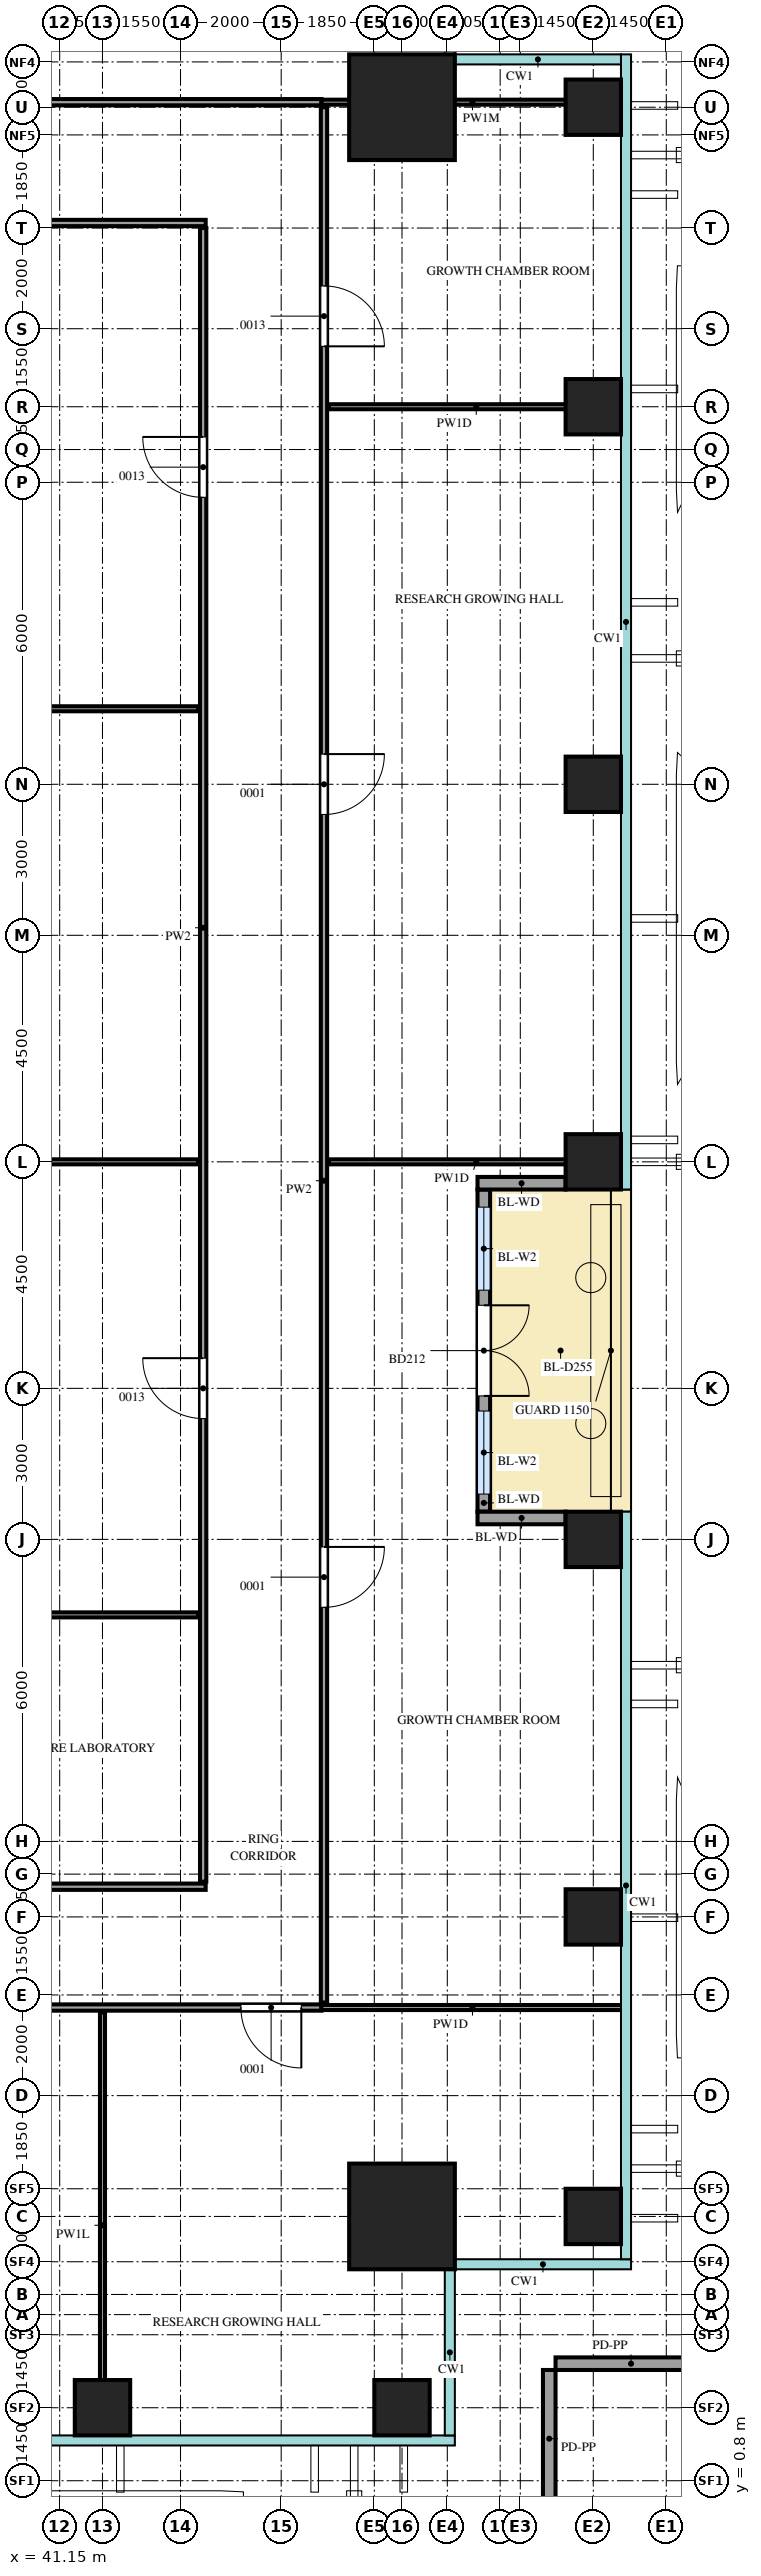
"""IFC4 building model, lengths in metres.
Left out: names, types, materials, properties, quantities, classifications, styles, units other than length and angle.
Written with IfcOpenShell. Run it as: python <this file> out.ifc"""

import sys

from ifc_helpers import new_model, si_unit, direction, frame, frame_2d, origin, origin_2d, place, context, subcontext, project, spatial, rectangle, extrude, source, transform, mapped, element, fill, save


model = new_model("IFC4")
c1 = context("Model", 3, precision=1e-05, world=origin(), true_north=direction((0.0, 1.0)))
c2 = subcontext(c1, "Body", "Model", "MODEL_VIEW")
j1 = project(units=[si_unit("LENGTHUNIT", "METRE"), si_unit("PLANEANGLEUNIT", "RADIAN")], contexts=[c1])
p1 = place(None, origin())
s1 = spatial("IfcSite", under=j1, at=p1, CompositionType="ELEMENT")
p2 = place(p1, origin())
s2 = spatial("IfcBuilding", under=s1, at=p2, CompositionType="ELEMENT")
p3 = place(p2, frame((0.0, 0.0, 101.5)))
s3 = spatial("IfcBuildingStorey", under=s2, at=p3, CompositionType="ELEMENT", Elevation=101.5)
m1 = source(origin(), c2, "Body", "SweptSolid", [
    extrude(rectangle(XDim=2.1, YDim=2.1, at=origin_2d()), origin(), (0.0, 0.0, 1.0), 4.4),
])
for number, where, z_axis, x_axis in (
    (1, (47.95, 47.95, 0.0), (0.0, 0.0, 1.0), (1.0, 0.0, 0.0)),
    (2, (47.95, 6.05, 0.0), (0.0, 0.0, 1.0), (1.0, 0.0, 0.0)),
):
    element("IfcColumn", number, at=place(p3, frame(where, z_axis=z_axis, x_axis=x_axis)), inside=s3, PredefinedType="COLUMN", context=c2, shape_type="MappedRepresentation", body=[
        mapped(m1, transform((0.0, 0.0, 0.0))),
    ])
m2 = source(origin(), c2, "Body", "SweptSolid", [
    extrude(rectangle(XDim=1.1, YDim=1.1, at=origin_2d()), origin(), (0.0, 0.0, 1.0), 4.1),
])
for number, where, z_axis, x_axis in (
    (3, (42.0, 2.25, 0.0), (0.0, 0.0, 1.0), (1.0, 0.0, 0.0)),
    (4, (47.95, 2.25, 0.0), (0.0, 0.0, 1.0), (1.0, 0.0, 0.0)),
    (5, (51.75, 6.05, 0.0), (0.0, 0.0, 1.0), (1.0, 0.0, 0.0)),
    (6, (51.75, 12.0, 0.0), (0.0, 0.0, 1.0), (1.0, 0.0, 0.0)),
    (7, (51.75, 19.5, 0.0), (0.0, 0.0, 1.0), (1.0, 0.0, 0.0)),
    (8, (51.75, 27.0, 0.0), (0.0, 0.0, 1.0), (1.0, 0.0, 0.0)),
    (9, (51.75, 34.5, 0.0), (0.0, 0.0, 1.0), (1.0, 0.0, 0.0)),
    (10, (51.75, 42.0, 0.0), (0.0, 0.0, 1.0), (1.0, 0.0, 0.0)),
    (11, (51.75, 47.95, 0.0), (0.0, 0.0, 1.0), (1.0, 0.0, 0.0)),
):
    element("IfcColumn", number, at=place(p3, frame(where, z_axis=z_axis, x_axis=x_axis)), inside=s3, PredefinedType="COLUMN", context=c2, shape_type="MappedRepresentation", body=[
        mapped(m2, transform((0.0, 0.0, 0.0))),
    ])
m3 = source(origin(), c2, "Body", "SweptSolid", [
    extrude(rectangle(XDim=6.4, YDim=0.25, at=frame_2d((3.2, 0.0))), origin(), (0.0, 0.0, 1.0), 3.55),
])
p4 = place(p3, frame((49.575, 20.05, 0.0), z_axis=(0.0, 0.0, 1.0), x_axis=(0.0, 1.0, 0.0)))
e12 = element("IfcWall", 12, at=p4, inside=s3, PredefinedType="SOLIDWALL", context=c2, shape_type="MappedRepresentation", body=[
    mapped(m3, transform((0.0, 0.0, 0.0))),
])
m4 = source(origin(), c2, "Body", "SweptSolid", [
    extrude(rectangle(XDim=1.65, YDim=2.4, at=frame_2d((0.825, 1.2))), frame((0.0, 0.135, 0.0), z_axis=(0.0, -1.0, 0.0), x_axis=(1.0, 0.0, 0.0)), (0.0, 0.0, 1.0), 0.27),
])
p5 = place(p4, frame((0.35, 0.0, 0.0)))
e13 = element("IfcOpeningElement", 13, at=p5, cuts=e12, PredefinedType="OPENING", context=c2, shape_type="MappedRepresentation", body=[
    mapped(m4, transform((0.0, 0.0, 0.0))),
])
p6 = place(p4, frame((4.4, 0.0, 0.0)))
e14 = element("IfcOpeningElement", 14, at=p6, cuts=e12, PredefinedType="OPENING", context=c2, shape_type="MappedRepresentation", body=[
    mapped(m4, transform((0.0, 0.0, 0.0))),
])
m5 = source(origin(), c2, "Body", "SweptSolid", [
    extrude(rectangle(XDim=1.8, YDim=2.4, at=frame_2d((0.9, 1.2))), frame((0.0, 0.135, 0.0), z_axis=(0.0, -1.0, 0.0), x_axis=(1.0, 0.0, 0.0)), (0.0, 0.0, 1.0), 0.27),
])
p7 = place(p4, frame((2.3, 0.0, 0.0)))
e15 = element("IfcOpeningElement", 15, at=p7, cuts=e12, PredefinedType="OPENING", context=c2, shape_type="MappedRepresentation", body=[
    mapped(m5, transform((0.0, 0.0, 0.0))),
])
m6 = source(origin(), c2, "Body", "SweptSolid", [
    extrude(rectangle(XDim=1.75, YDim=0.25, at=frame_2d((0.875, 0.0))), origin(), (0.0, 0.0, 1.0), 3.55),
])
for number, where, z_axis, x_axis in (
    (16, (51.2, 19.925, 0.0), (0.0, 0.0, 1.0), (-1.0, 0.0, 0.0)),
    (17, (51.2, 26.575, 0.0), (0.0, 0.0, 1.0), (-1.0, 0.0, 0.0)),
):
    element("IfcWall", number, at=place(p3, frame(where, z_axis=z_axis, x_axis=x_axis)), inside=s3, PredefinedType="SOLIDWALL", context=c2, shape_type="MappedRepresentation", body=[
        mapped(m6, transform((0.0, 0.0, 0.0))),
    ])
m7 = source(origin(), c2, "Body", "SweptSolid", [
    extrude(rectangle(XDim=2.73, YDim=0.25, at=frame_2d((1.365, 0.0))), origin(), (0.0, 0.0, 1.0), 1.1),
])
p8 = place(p3, frame((50.875, 0.27, 0.0), z_axis=(0.0, 0.0, 1.0), x_axis=(0.0, 1.0, 0.0)))
e18 = element("IfcWall", 18, at=p8, inside=s3, PredefinedType="SOLIDWALL", context=c2, shape_type="MappedRepresentation", body=[
    mapped(m7, transform((0.0, 0.0, 0.0))),
])
m8 = source(origin(), c2, "Body", "SweptSolid", [
    extrude(rectangle(XDim=3.0, YDim=0.25, at=frame_2d((1.5, 0.0))), origin(), (0.0, 0.0, 1.0), 1.1),
])
p9 = place(p3, frame((51.0, 3.125, 0.0), z_axis=(0.0, 0.0, 1.0), x_axis=(1.0, 0.0, 0.0)))
e19 = element("IfcWall", 19, at=p9, inside=s3, PredefinedType="SOLIDWALL", context=c2, shape_type="MappedRepresentation", body=[
    mapped(m8, transform((0.0, 0.0, 0.0))),
])
m9 = source(origin(), c2, "Body", "SweptSolid", [
    extrude(rectangle(XDim=8.45, YDim=0.1, at=frame_2d((4.225, 0.0))), origin(), (0.0, 0.0, 1.0), 3.6),
])
p10 = place(p3, frame((42.0, 1.65, 0.0), z_axis=(0.0, 0.0, 1.0), x_axis=(0.0, 1.0, 0.0)))
e20 = element("IfcWall", 20, at=p10, inside=s3, PredefinedType="PARTITIONING", context=c2, shape_type="MappedRepresentation", body=[
    mapped(m9, transform((0.0, 0.0, 0.0))),
])
m10 = source(origin(), c2, "Body", "SweptSolid", [
    extrude(rectangle(XDim=20.0, YDim=0.125, at=frame_2d((10.0, 0.0))), origin(), (0.0, 0.0, 1.0), 4.2),
])
p11 = place(p3, frame((26.35, 10.2, 0.0), z_axis=(0.0, 0.0, 1.0), x_axis=(1.0, 0.0, 0.0)))
e21 = element("IfcWall", 21, at=p11, inside=s3, PredefinedType="PARTITIONING", context=c2, shape_type="MappedRepresentation", body=[
    mapped(m10, transform((0.0, 0.0, 0.0))),
])
m11 = source(origin(), c2, "Body", "SweptSolid", [
    extrude(rectangle(XDim=0.9, YDim=2.1, at=frame_2d((0.45, 1.05))), frame((0.0, 0.073, 0.0), z_axis=(0.0, -1.0, 0.0), x_axis=(1.0, 0.0, 0.0)), (0.0, 0.0, 1.0), 0.145),
])
p12 = place(p11, frame((3.8, 0.0, 0.0)))
e22 = element("IfcOpeningElement", 22, at=p12, cuts=e21, PredefinedType="OPENING", context=c2, shape_type="MappedRepresentation", body=[
    mapped(m11, transform((0.0, 0.0, 0.0))),
])
p13 = place(p11, frame((11.3, 0.0, 0.0)))
e23 = element("IfcOpeningElement", 23, at=p13, cuts=e21, PredefinedType="OPENING", context=c2, shape_type="MappedRepresentation", body=[
    mapped(m11, transform((0.0, 0.0, 0.0))),
])
m12 = source(origin(), c2, "Body", "SweptSolid", [
    extrude(rectangle(XDim=1.2, YDim=2.1, at=frame_2d((0.6, 1.05))), frame((0.0, 0.073, 0.0), z_axis=(0.0, -1.0, 0.0), x_axis=(1.0, 0.0, 0.0)), (0.0, 0.0, 1.0), 0.145),
])
p14 = place(p11, frame((18.4, 0.0, 0.0)))
e24 = element("IfcOpeningElement", 24, at=p14, cuts=e21, PredefinedType="OPENING", context=c2, shape_type="MappedRepresentation", body=[
    mapped(m12, transform((0.0, 0.0, 0.0))),
])
m13 = source(origin(), c2, "Body", "SweptSolid", [
    extrude(rectangle(XDim=6.0, YDim=0.1, at=frame_2d((3.0, 0.0))), origin(), (0.0, 0.0, 1.0), 4.2),
])
p15 = place(p3, frame((46.35, 10.2, 0.0), z_axis=(0.0, 0.0, 1.0), x_axis=(1.0, 0.0, 0.0)))
e25 = element("IfcWall", 25, at=p15, inside=s3, PredefinedType="PARTITIONING", context=c2, shape_type="MappedRepresentation", body=[
    mapped(m13, transform((0.0, 0.0, 0.0))),
])
m14 = source(origin(), c2, "Body", "SweptSolid", [
    extrude(rectangle(XDim=37.65, YDim=0.125, at=frame_2d((18.825, 0.0))), origin(), (0.0, 0.0, 1.0), 4.2),
])
p16 = place(p3, frame((46.4, 10.3, 0.0), z_axis=(0.0, 0.0, 1.0), x_axis=(0.0, 1.0, 0.0)))
e26 = element("IfcWall", 26, at=p16, inside=s3, PredefinedType="PARTITIONING", context=c2, shape_type="MappedRepresentation", body=[
    mapped(m14, transform((0.0, 0.0, 0.0))),
])
p17 = place(p16, frame((7.85, 0.0, 0.0)))
e27 = element("IfcOpeningElement", 27, at=p17, cuts=e26, PredefinedType="OPENING", context=c2, shape_type="MappedRepresentation", body=[
    mapped(m12, transform((0.0, 0.0, 0.0))),
])
p18 = place(p16, frame((23.6, 0.0, 0.0)))
e28 = element("IfcOpeningElement", 28, at=p18, cuts=e26, PredefinedType="OPENING", context=c2, shape_type="MappedRepresentation", body=[
    mapped(m12, transform((0.0, 0.0, 0.0))),
])
p19 = place(p16, frame((32.9, 0.0, 0.0)))
e29 = element("IfcOpeningElement", 29, at=p19, cuts=e26, PredefinedType="OPENING", context=c2, shape_type="MappedRepresentation", body=[
    mapped(m12, transform((0.0, 0.0, 0.0))),
])
m15 = source(origin(), c2, "Body", "SweptSolid", [
    extrude(rectangle(XDim=17.7, YDim=0.125, at=frame_2d((8.85, 0.0))), origin(), (0.0, 0.0, 1.0), 4.2),
])
p20 = place(p3, frame((26.35, 12.6, 0.0), z_axis=(0.0, 0.0, 1.0), x_axis=(1.0, 0.0, 0.0)))
e30 = element("IfcWall", 30, at=p20, inside=s3, PredefinedType="PARTITIONING", context=c2, shape_type="MappedRepresentation", body=[
    mapped(m15, transform((0.0, 0.0, 0.0))),
])
m16 = source(origin(), c2, "Body", "SweptSolid", [
    extrude(rectangle(XDim=32.85, YDim=0.125, at=frame_2d((16.425, 0.0))), origin(), (0.0, 0.0, 1.0), 4.2),
])
p21 = place(p3, frame((44.0, 12.7, 0.0), z_axis=(0.0, 0.0, 1.0), x_axis=(0.0, 1.0, 0.0)))
e31 = element("IfcWall", 31, at=p21, inside=s3, PredefinedType="PARTITIONING", context=c2, shape_type="MappedRepresentation", body=[
    mapped(m16, transform((0.0, 0.0, 0.0))),
])
p22 = place(p21, frame((9.2, 0.0, 0.0)))
e32 = element("IfcOpeningElement", 32, at=p22, cuts=e31, PredefinedType="OPENING", context=c2, shape_type="MappedRepresentation", body=[
    mapped(m12, transform((0.0, 0.0, 0.0))),
])
p23 = place(p21, frame((27.5, 0.0, 0.0)))
e33 = element("IfcOpeningElement", 33, at=p23, cuts=e31, PredefinedType="OPENING", context=c2, shape_type="MappedRepresentation", body=[
    mapped(m12, transform((0.0, 0.0, 0.0))),
])
m17 = source(origin(), c2, "Body", "SweptSolid", [
    extrude(rectangle(XDim=17.4, YDim=0.1, at=frame_2d((8.7, 0.0))), origin(), (0.0, 0.0, 1.0), 4.2),
])
for number, where, z_axis, x_axis in (
    (34, (26.5, 18.0, 0.0), (0.0, 0.0, 1.0), (1.0, 0.0, 0.0)),
    (35, (26.5, 27.0, 0.0), (0.0, 0.0, 1.0), (1.0, 0.0, 0.0)),
):
    element("IfcWall", number, at=place(p3, frame(where, z_axis=z_axis, x_axis=x_axis)), inside=s3, PredefinedType="PARTITIONING", context=c2, shape_type="MappedRepresentation", body=[
        mapped(m17, transform((0.0, 0.0, 0.0))),
    ])
m18 = source(origin(), c2, "Body", "SweptSolid", [
    extrude(rectangle(XDim=5.85, YDim=0.1, at=frame_2d((2.925, 0.0))), origin(), (0.0, 0.0, 1.0), 4.2),
])
p24 = place(p3, frame((46.5, 27.0, 0.0), z_axis=(0.0, 0.0, 1.0), x_axis=(1.0, 0.0, 0.0)))
e36 = element("IfcWall", 36, at=p24, inside=s3, PredefinedType="PARTITIONING", context=c2, shape_type="MappedRepresentation", body=[
    mapped(m18, transform((0.0, 0.0, 0.0))),
])
m19 = source(origin(), c2, "Body", "SweptSolid", [
    extrude(rectangle(XDim=13.35, YDim=0.1, at=frame_2d((6.675, 0.0))), origin(), (0.0, 0.0, 1.0), 4.2),
])
p25 = place(p3, frame((30.55, 36.0, 0.0), z_axis=(0.0, 0.0, 1.0), x_axis=(1.0, 0.0, 0.0)))
e37 = element("IfcWall", 37, at=p25, inside=s3, PredefinedType="PARTITIONING", context=c2, shape_type="MappedRepresentation", body=[
    mapped(m19, transform((0.0, 0.0, 0.0))),
])
p26 = place(p3, frame((46.5, 42.0, 0.0), z_axis=(0.0, 0.0, 1.0), x_axis=(1.0, 0.0, 0.0)))
e38 = element("IfcWall", 38, at=p26, inside=s3, PredefinedType="PARTITIONING", context=c2, shape_type="MappedRepresentation", body=[
    mapped(m18, transform((0.0, 0.0, 0.0))),
])
m20 = source(origin(), c2, "Body", "SweptSolid", [
    extrude(rectangle(XDim=13.5, YDim=0.125, at=frame_2d((6.75, 0.0))), origin(), (0.0, 0.0, 1.0), 4.2),
])
p27 = place(p3, frame((30.55, 45.65, 0.0), z_axis=(0.0, 0.0, 1.0), x_axis=(1.0, 0.0, 0.0)))
e39 = element("IfcWall", 39, at=p27, inside=s3, PredefinedType="PARTITIONING", context=c2, shape_type="MappedRepresentation", body=[
    mapped(m20, transform((0.0, 0.0, 0.0))),
])
m21 = source(origin(), c2, "Body", "SweptSolid", [
    extrude(rectangle(XDim=42.2, YDim=0.125, at=frame_2d((21.1, 0.0))), origin(), (0.0, 0.0, 1.0), 3.55),
])
p28 = place(p3, frame((4.15, 48.05, 0.0), z_axis=(0.0, 0.0, 1.0), x_axis=(1.0, 0.0, 0.0)))
e40 = element("IfcWall", 40, at=p28, inside=s3, PredefinedType="PARTITIONING", context=c2, shape_type="MappedRepresentation", body=[
    mapped(m21, transform((0.0, 0.0, 0.0))),
])
p29 = place(p28, frame((7.25, 0.0, 0.0)))
e41 = element("IfcOpeningElement", 41, at=p29, cuts=e40, PredefinedType="OPENING", context=c2, shape_type="MappedRepresentation", body=[
    mapped(m11, transform((0.0, 0.0, 0.0))),
])
p30 = place(p28, frame((28.35, 0.0, 0.0)))
e42 = element("IfcOpeningElement", 42, at=p30, cuts=e40, PredefinedType="OPENING", context=c2, shape_type="MappedRepresentation", body=[
    mapped(m12, transform((0.0, 0.0, 0.0))),
])
m22 = source(origin(), c2, "Body", "SweptSolid", [
    extrude(rectangle(XDim=6.0, YDim=0.1, at=frame_2d((3.0, 0.0))), origin(), (0.0, 0.0, 1.0), 3.55),
])
p31 = place(p3, frame((46.35, 48.05, 0.0), z_axis=(0.0, 0.0, 1.0), x_axis=(1.0, 0.0, 0.0)))
e43 = element("IfcWall", 43, at=p31, inside=s3, PredefinedType="PARTITIONING", context=c2, shape_type="MappedRepresentation", body=[
    mapped(m22, transform((0.0, 0.0, 0.0))),
])
m23 = source(origin(), c2, "Body", "SweptSolid", [
    extrude(rectangle(XDim=1.65, YDim=2.4, at=frame_2d((0.825, 1.2))), frame((0.0, 0.03, 0.0), z_axis=(0.0, -1.0, 0.0), x_axis=(1.0, 0.0, 0.0)), (0.0, 0.0, 1.0), 0.06),
])
p32 = place(p5, origin())
e44 = element("IfcWindow", 44, at=p32, inside=s3, PartitioningType="SINGLE_PANEL", PredefinedType="WINDOW", context=c2, shape_type="MappedRepresentation", body=[
    mapped(m23, transform((0.0, 0.0, 0.0))),
])
fill(e13, e44)
p33 = place(p6, origin())
e45 = element("IfcWindow", 45, at=p33, inside=s3, PartitioningType="SINGLE_PANEL", PredefinedType="WINDOW", context=c2, shape_type="MappedRepresentation", body=[
    mapped(m23, transform((0.0, 0.0, 0.0))),
])
fill(e14, e45)
m24 = source(origin(), c2, "Body", "SweptSolid", [
    extrude(rectangle(XDim=1.8, YDim=2.4, at=frame_2d((0.9, 1.2))), frame((0.0, 0.025, 0.0), z_axis=(0.0, -1.0, 0.0), x_axis=(1.0, 0.0, 0.0)), (0.0, 0.0, 1.0), 0.05),
])
p34 = place(p7, origin())
e46 = element("IfcDoor", 46, at=p34, inside=s3, OperationType="DOUBLE_DOOR_DOUBLE_SWING", PredefinedType="DOOR", context=c2, shape_type="MappedRepresentation", body=[
    mapped(m24, transform((0.0, 0.0, 0.0))),
])
fill(e15, e46)
m25 = source(origin(), c2, "Body", "SweptSolid", [
    extrude(rectangle(XDim=1.2, YDim=2.1, at=frame_2d((0.6, 1.05))), frame((0.0, 0.025, 0.0), z_axis=(0.0, -1.0, 0.0), x_axis=(1.0, 0.0, 0.0)), (0.0, 0.0, 1.0), 0.05),
])
p35 = place(p14, origin())
e47 = element("IfcDoor", 47, at=p35, inside=s3, OperationType="SINGLE_SWING_RIGHT", PredefinedType="DOOR", context=c2, shape_type="MappedRepresentation", body=[
    mapped(m25, transform((0.0, 0.0, 0.0))),
])
fill(e24, e47)
p36 = place(p22, origin())
e48 = element("IfcDoor", 48, at=p36, inside=s3, OperationType="SINGLE_SWING_LEFT", PredefinedType="DOOR", context=c2, shape_type="MappedRepresentation", body=[
    mapped(m25, transform((0.0, 0.0, 0.0))),
])
fill(e32, e48)
p37 = place(p23, origin())
e49 = element("IfcDoor", 49, at=p37, inside=s3, OperationType="SINGLE_SWING_LEFT", PredefinedType="DOOR", context=c2, shape_type="MappedRepresentation", body=[
    mapped(m25, transform((0.0, 0.0, 0.0))),
])
fill(e33, e49)
p38 = place(p17, origin())
e50 = element("IfcDoor", 50, at=p38, inside=s3, OperationType="SINGLE_SWING_RIGHT", PredefinedType="DOOR", context=c2, shape_type="MappedRepresentation", body=[
    mapped(m25, transform((0.0, 0.0, 0.0))),
])
fill(e27, e50)
p39 = place(p18, origin())
e51 = element("IfcDoor", 51, at=p39, inside=s3, OperationType="SINGLE_SWING_RIGHT", PredefinedType="DOOR", context=c2, shape_type="MappedRepresentation", body=[
    mapped(m25, transform((0.0, 0.0, 0.0))),
])
fill(e28, e51)
p40 = place(p19, origin())
e52 = element("IfcDoor", 52, at=p40, inside=s3, OperationType="SINGLE_SWING_LEFT", PredefinedType="DOOR", context=c2, shape_type="MappedRepresentation", body=[
    mapped(m25, transform((0.0, 0.0, 0.0))),
])
fill(e29, e52)
save(model, sys.argv[1])
